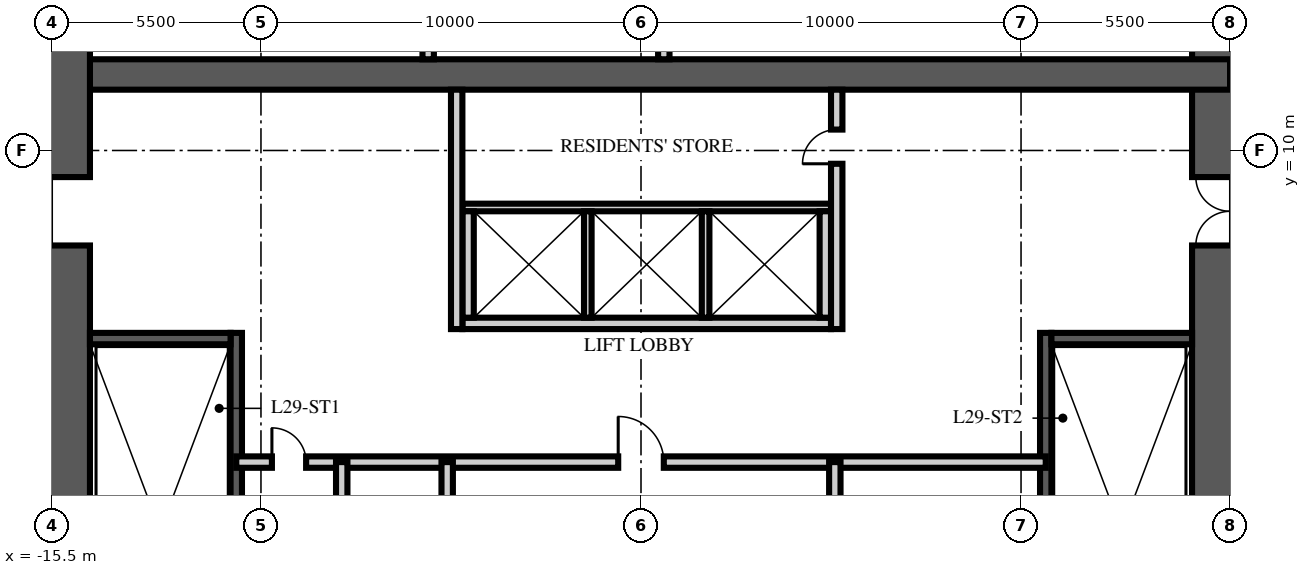
"""IFC4 building model, lengths in metres.
Left out: names, types, materials, properties, quantities, classifications, styles, units other than length and angle.
Written with IfcOpenShell. Run it as: python <this file> out.ifc"""

import sys

from ifc_helpers import new_model, si_unit, direction, frame, frame_2d, origin, place, context, subcontext, project, spatial, rectangle, extrude, element, fill, save


model = new_model("IFC4")
c1 = context("Model", 3, precision=1e-05, world=origin(), true_north=direction((0.0, 1.0)))
c2 = subcontext(c1, "Body", "Model", "MODEL_VIEW")
j1 = project(units=[si_unit("LENGTHUNIT", "METRE"), si_unit("PLANEANGLEUNIT", "RADIAN")], contexts=[c1])
p1 = place(None, origin())
s1 = spatial("IfcSite", under=j1, at=p1, CompositionType="ELEMENT")
p2 = place(p1, origin())
s2 = spatial("IfcBuilding", under=s1, at=p2, CompositionType="ELEMENT")
p3 = place(p2, frame((0.0, 0.0, 118.5)))
s3 = spatial("IfcBuildingStorey", under=s2, at=p3, CompositionType="ELEMENT", Elevation=118.5)
p4 = place(p3, frame((15.5, -15.5, -0.25), z_axis=(0.0, 0.0, 1.0), x_axis=(0.0, 1.0, 0.0)))
e1 = element("IfcWall", 1, at=p4, inside=s3, PredefinedType="SHEAR", context=c2, shape_type="SweptSolid", body=[
    extrude(rectangle(XDim=31.0, YDim=2.0, at=frame_2d((15.5, 0.0))), origin(), (0.0, 0.0, 1.0), 3.75),
])
p5 = place(p4, frame((6.5, 0.0, 0.25)))
e2 = element("IfcOpeningElement", 2, at=p5, cuts=e1, PredefinedType="OPENING", context=c2, shape_type="SweptSolid", body=[
    extrude(rectangle(XDim=1.2, YDim=2.1, at=frame_2d((0.6, 1.05))), frame((0.0, 1.01, 0.0), z_axis=(0.0, -1.0, 0.0), x_axis=(1.0, 0.0, 0.0)), (0.0, 0.0, 1.0), 2.02),
])
p6 = place(p4, frame((23.0, 0.0, 0.25)))
e3 = element("IfcOpeningElement", 3, at=p6, cuts=e1, PredefinedType="OPENING", context=c2, shape_type="SweptSolid", body=[
    extrude(rectangle(XDim=1.8, YDim=2.1, at=frame_2d((0.9, 1.05))), frame((0.0, 1.01, 0.0), z_axis=(0.0, -1.0, 0.0), x_axis=(1.0, 0.0, 0.0)), (0.0, 0.0, 1.0), 2.02),
])
p7 = place(p3, frame((-15.5, 12.0, -0.25), z_axis=(0.0, 0.0, 1.0), x_axis=(1.0, 0.0, 0.0)))
e4 = element("IfcWall", 4, at=p7, inside=s3, PredefinedType="SHEAR", context=c2, shape_type="SweptSolid", body=[
    extrude(rectangle(XDim=31.0, YDim=0.8, at=frame_2d((15.5, 0.0))), origin(), (0.0, 0.0, 1.0), 3.75),
])
p8 = place(p3, frame((-15.5, -15.5, -0.25), z_axis=(0.0, 0.0, 1.0), x_axis=(0.0, 1.0, 0.0)))
e5 = element("IfcWall", 5, at=p8, inside=s3, PredefinedType="SHEAR", context=c2, shape_type="SweptSolid", body=[
    extrude(rectangle(XDim=31.0, YDim=2.0, at=frame_2d((15.5, 0.0))), origin(), (0.0, 0.0, 1.0), 3.75),
])
p9 = place(p8, frame((6.5, 0.0, 0.25)))
e6 = element("IfcOpeningElement", 6, at=p9, cuts=e5, PredefinedType="OPENING", context=c2, shape_type="SweptSolid", body=[
    extrude(rectangle(XDim=1.2, YDim=2.1, at=frame_2d((0.6, 1.05))), frame((0.0, 1.01, 0.0), z_axis=(0.0, -1.0, 0.0), x_axis=(1.0, 0.0, 0.0)), (0.0, 0.0, 1.0), 2.02),
])
p10 = place(p8, frame((23.0, 0.0, 0.25)))
e7 = element("IfcOpeningElement", 7, at=p10, cuts=e5, PredefinedType="OPENING", context=c2, shape_type="SweptSolid", body=[
    extrude(rectangle(XDim=1.8, YDim=2.1, at=frame_2d((0.9, 1.05))), frame((0.0, 1.01, 0.0), z_axis=(0.0, -1.0, 0.0), x_axis=(1.0, 0.0, 0.0)), (0.0, 0.0, 1.0), 2.02),
])
p11 = place(p3, frame((-10.65, -4.9, 0.0), z_axis=(0.0, 0.0, 1.0), x_axis=(0.0, 1.0, 0.0)))
e8 = element("IfcWall", 8, at=p11, inside=s3, PredefinedType="SOLIDWALL", context=c2, shape_type="SweptSolid", body=[
    extrude(rectangle(XDim=10.1, YDim=0.3, at=frame_2d((5.05, 0.0))), origin(), (0.0, 0.0, 1.0), 3.5),
])
p12 = place(p3, frame((-14.5, 5.05, 0.0), z_axis=(0.0, 0.0, 1.0), x_axis=(1.0, 0.0, 0.0)))
e9 = element("IfcWall", 9, at=p12, inside=s3, PredefinedType="SOLIDWALL", context=c2, shape_type="SweptSolid", body=[
    extrude(rectangle(XDim=3.7, YDim=0.3, at=frame_2d((1.85, 0.0))), origin(), (0.0, 0.0, 1.0), 3.5),
])
p13 = place(p3, frame((10.65, -4.9, 0.0), z_axis=(0.0, 0.0, 1.0), x_axis=(0.0, 1.0, 0.0)))
e10 = element("IfcWall", 10, at=p13, inside=s3, PredefinedType="SOLIDWALL", context=c2, shape_type="SweptSolid", body=[
    extrude(rectangle(XDim=10.1, YDim=0.3, at=frame_2d((5.05, 0.0))), origin(), (0.0, 0.0, 1.0), 3.5),
])
p14 = place(p3, frame((14.5, 5.05, 0.0), z_axis=(0.0, 0.0, 1.0), x_axis=(-1.0, 0.0, 0.0)))
e11 = element("IfcWall", 11, at=p14, inside=s3, PredefinedType="SOLIDWALL", context=c2, shape_type="SweptSolid", body=[
    extrude(rectangle(XDim=3.7, YDim=0.3, at=frame_2d((1.85, 0.0))), origin(), (0.0, 0.0, 1.0), 3.5),
])
p15 = place(p3, frame((-4.7, 5.45, 0.0), z_axis=(0.0, 0.0, 1.0), x_axis=(1.0, 0.0, 0.0)))
e12 = element("IfcWall", 12, at=p15, inside=s3, PredefinedType="PARTITIONING", context=c2, shape_type="SweptSolid", body=[
    extrude(rectangle(XDim=9.7, YDim=0.3, at=frame_2d((4.85, 0.0))), origin(), (0.0, 0.0, 1.0), 3.5),
])
p16 = place(p3, frame((-4.7, 8.5, 0.0), z_axis=(0.0, 0.0, 1.0), x_axis=(1.0, 0.0, 0.0)))
e13 = element("IfcWall", 13, at=p16, inside=s3, PredefinedType="PARTITIONING", context=c2, shape_type="SweptSolid", body=[
    extrude(rectangle(XDim=9.7, YDim=0.2, at=frame_2d((4.85, 0.0))), origin(), (0.0, 0.0, 1.0), 3.5),
])
for number, where, z_axis, x_axis in (
    (14, (-4.55, 5.6, 0.0), (0.0, 0.0, 1.0), (0.0, 1.0, 0.0)),
    (15, (4.85, 5.6, 0.0), (0.0, 0.0, 1.0), (0.0, 1.0, 0.0)),
):
    element("IfcWall", number, at=place(p3, frame(where, z_axis=z_axis, x_axis=x_axis)), inside=s3, PredefinedType="PARTITIONING", context=c2, shape_type="SweptSolid", body=[
        extrude(rectangle(XDim=2.8, YDim=0.3, at=frame_2d((1.4, 0.0))), origin(), (0.0, 0.0, 1.0), 3.5),
    ])
for number, where, z_axis, x_axis in (
    (16, (-1.4, 5.6, 0.0), (0.0, 0.0, 1.0), (0.0, 1.0, 0.0)),
    (17, (1.7, 5.6, 0.0), (0.0, 0.0, 1.0), (0.0, 1.0, 0.0)),
):
    element("IfcWall", number, at=place(p3, frame(where, z_axis=z_axis, x_axis=x_axis)), inside=s3, PredefinedType="PARTITIONING", context=c2, shape_type="SweptSolid", body=[
        extrude(rectangle(XDim=2.8, YDim=0.2, at=frame_2d((1.4, 0.0))), origin(), (0.0, 0.0, 1.0), 3.5),
    ])
p17 = place(p3, frame((-10.65, 1.8, 0.0), z_axis=(0.0, 0.0, 1.0), x_axis=(1.0, 0.0, 0.0)))
e18 = element("IfcWall", 18, at=p17, inside=s3, PredefinedType="PARTITIONING", context=c2, shape_type="SweptSolid", body=[
    extrude(rectangle(XDim=21.3, YDim=0.3, at=frame_2d((10.65, 0.0))), origin(), (0.0, 0.0, 1.0), 3.5),
])
p18 = place(p17, frame((10.05, 0.0, 0.0)))
e19 = element("IfcOpeningElement", 19, at=p18, cuts=e18, PredefinedType="OPENING", context=c2, shape_type="SweptSolid", body=[
    extrude(rectangle(XDim=1.2, YDim=2.1, at=frame_2d((0.6, 1.05))), frame((0.0, 0.16, 0.0), z_axis=(0.0, -1.0, 0.0), x_axis=(1.0, 0.0, 0.0)), (0.0, 0.0, 1.0), 0.32),
])
p19 = place(p17, frame((0.938, 0.0, 0.0)))
e20 = element("IfcOpeningElement", 20, at=p19, cuts=e18, PredefinedType="OPENING", context=c2, shape_type="SweptSolid", body=[
    extrude(rectangle(XDim=0.9, YDim=2.1, at=frame_2d((0.45, 1.05))), frame((0.0, 0.16, 0.0), z_axis=(0.0, -1.0, 0.0), x_axis=(1.0, 0.0, 0.0)), (0.0, 0.0, 1.0), 0.32),
])
p20 = place(p3, frame((-5.1, -6.65, 0.0), z_axis=(0.0, 0.0, 1.0), x_axis=(0.0, 1.0, 0.0)))
e21 = element("IfcWall", 21, at=p20, inside=s3, PredefinedType="PARTITIONING", context=c2, shape_type="SweptSolid", body=[
    extrude(rectangle(XDim=8.45, YDim=0.3, at=frame_2d((4.225, 0.0))), origin(), (0.0, 0.0, 1.0), 3.5),
])
p21 = place(p20, frame((1.7, 0.0, 0.0)))
e22 = element("IfcOpeningElement", 22, at=p21, cuts=e21, PredefinedType="OPENING", context=c2, shape_type="SweptSolid", body=[
    extrude(rectangle(XDim=0.9, YDim=2.1, at=frame_2d((0.45, 1.05))), frame((0.0, 0.16, 0.0), z_axis=(0.0, -1.0, 0.0), x_axis=(1.0, 0.0, 0.0)), (0.0, 0.0, 1.0), 0.32),
])
p22 = place(p20, frame((5.925, 0.0, 0.0)))
e23 = element("IfcOpeningElement", 23, at=p22, cuts=e21, PredefinedType="OPENING", context=c2, shape_type="SweptSolid", body=[
    extrude(rectangle(XDim=0.9, YDim=2.1, at=frame_2d((0.45, 1.05))), frame((0.0, 0.16, 0.0), z_axis=(0.0, -1.0, 0.0), x_axis=(1.0, 0.0, 0.0)), (0.0, 0.0, 1.0), 0.32),
])
p23 = place(p3, frame((5.1, -6.65, 0.0), z_axis=(0.0, 0.0, 1.0), x_axis=(0.0, 1.0, 0.0)))
e24 = element("IfcWall", 24, at=p23, inside=s3, PredefinedType="PARTITIONING", context=c2, shape_type="SweptSolid", body=[
    extrude(rectangle(XDim=8.45, YDim=0.3, at=frame_2d((4.225, 0.0))), origin(), (0.0, 0.0, 1.0), 3.5),
])
p24 = place(p23, frame((1.866, 0.0, 0.0)))
e25 = element("IfcOpeningElement", 25, at=p24, cuts=e24, PredefinedType="OPENING", context=c2, shape_type="SweptSolid", body=[
    extrude(rectangle(XDim=0.9, YDim=2.1, at=frame_2d((0.45, 1.05))), frame((0.0, 0.16, 0.0), z_axis=(0.0, -1.0, 0.0), x_axis=(1.0, 0.0, 0.0)), (0.0, 0.0, 1.0), 0.32),
])
p25 = place(p23, frame((6.091, 0.0, 0.0)))
e26 = element("IfcOpeningElement", 26, at=p25, cuts=e24, PredefinedType="OPENING", context=c2, shape_type="SweptSolid", body=[
    extrude(rectangle(XDim=0.9, YDim=2.1, at=frame_2d((0.45, 1.05))), frame((0.0, 0.16, 0.0), z_axis=(0.0, -1.0, 0.0), x_axis=(1.0, 0.0, 0.0)), (0.0, 0.0, 1.0), 0.32),
])
p26 = place(p3, frame((-7.875, -2.35, 0.0), z_axis=(0.0, 0.0, 1.0), x_axis=(0.0, 1.0, 0.0)))
e27 = element("IfcWall", 27, at=p26, inside=s3, PredefinedType="PARTITIONING", context=c2, shape_type="SweptSolid", body=[
    extrude(rectangle(XDim=4.15, YDim=0.3, at=frame_2d((2.075, 0.0))), origin(), (0.0, 0.0, 1.0), 3.5),
])
p27 = place(p3, frame((-4.85, 5.3, 0.0), z_axis=(0.0, 0.0, 1.0), x_axis=(0.0, 1.0, 0.0)))
e28 = element("IfcWall", 28, at=p27, inside=s3, PredefinedType="PARTITIONING", context=c2, shape_type="SweptSolid", body=[
    extrude(rectangle(XDim=6.3, YDim=0.3, at=frame_2d((3.15, 0.0))), origin(), (0.0, 0.0, 1.0), 3.5),
])
p28 = place(p3, frame((5.15, 5.3, 0.0), z_axis=(0.0, 0.0, 1.0), x_axis=(0.0, 1.0, 0.0)))
e29 = element("IfcWall", 29, at=p28, inside=s3, PredefinedType="PARTITIONING", context=c2, shape_type="SweptSolid", body=[
    extrude(rectangle(XDim=6.3, YDim=0.3, at=frame_2d((3.15, 0.0))), origin(), (0.0, 0.0, 1.0), 3.5),
])
p29 = place(p28, frame((4.35, 0.0, 0.0)))
e30 = element("IfcOpeningElement", 30, at=p29, cuts=e29, PredefinedType="OPENING", context=c2, shape_type="SweptSolid", body=[
    extrude(rectangle(XDim=0.9, YDim=2.1, at=frame_2d((0.45, 1.05))), frame((0.0, 0.16, 0.0), z_axis=(0.0, -1.0, 0.0), x_axis=(1.0, 0.0, 0.0)), (0.0, 0.0, 1.0), 0.32),
])
p30 = place(p3, frame((-5.6, 12.4, 0.0), z_axis=(0.0, 0.0, 1.0), x_axis=(0.0, 1.0, 0.0)))
e31 = element("IfcWall", 31, at=p30, inside=s3, PredefinedType="PARTITIONING", context=c2, shape_type="SweptSolid", body=[
    extrude(rectangle(XDim=2.1, YDim=0.3, at=frame_2d((1.05, 0.0))), origin(), (0.0, 0.0, 1.0), 3.5),
])
p31 = place(p30, frame((0.6, 0.0, 0.0)))
e32 = element("IfcOpeningElement", 32, at=p31, cuts=e31, PredefinedType="OPENING", context=c2, shape_type="SweptSolid", body=[
    extrude(rectangle(XDim=0.9, YDim=2.1, at=frame_2d((0.45, 1.05))), frame((0.0, 0.16, 0.0), z_axis=(0.0, -1.0, 0.0), x_axis=(1.0, 0.0, 0.0)), (0.0, 0.0, 1.0), 0.32),
])
p32 = place(p3, frame((0.6, 12.4, 0.0), z_axis=(0.0, 0.0, 1.0), x_axis=(0.0, 1.0, 0.0)))
e33 = element("IfcWall", 33, at=p32, inside=s3, PredefinedType="PARTITIONING", context=c2, shape_type="SweptSolid", body=[
    extrude(rectangle(XDim=2.1, YDim=0.3, at=frame_2d((1.05, 0.0))), origin(), (0.0, 0.0, 1.0), 3.5),
])
p33 = place(p32, frame((0.6, 0.0, 0.0)))
e34 = element("IfcOpeningElement", 34, at=p33, cuts=e33, PredefinedType="OPENING", context=c2, shape_type="SweptSolid", body=[
    extrude(rectangle(XDim=0.9, YDim=2.1, at=frame_2d((0.45, 1.05))), frame((0.0, 0.16, 0.0), z_axis=(0.0, -1.0, 0.0), x_axis=(1.0, 0.0, 0.0)), (0.0, 0.0, 1.0), 0.32),
])
p34 = place(p10, origin())
e35 = element("IfcDoor", 35, at=p34, inside=s3, OperationType="DOUBLE_DOOR_SINGLE_SWING", PredefinedType="DOOR", context=c2, shape_type="SweptSolid", body=[
    extrude(rectangle(XDim=1.8, YDim=2.1, at=frame_2d((0.9, 1.05))), frame((0.0, 0.025, 0.0), z_axis=(0.0, -1.0, 0.0), x_axis=(1.0, 0.0, 0.0)), (0.0, 0.0, 1.0), 0.05),
])
fill(e7, e35)
p35 = place(p6, origin())
e36 = element("IfcDoor", 36, at=p35, inside=s3, OperationType="DOUBLE_DOOR_SINGLE_SWING", PredefinedType="DOOR", context=c2, shape_type="SweptSolid", body=[
    extrude(rectangle(XDim=1.8, YDim=2.1, at=frame_2d((0.9, 1.05))), frame((0.0, 0.025, 0.0), z_axis=(0.0, -1.0, 0.0), x_axis=(1.0, 0.0, 0.0)), (0.0, 0.0, 1.0), 0.05),
])
fill(e3, e36)
p36 = place(p18, origin())
e37 = element("IfcDoor", 37, at=p36, inside=s3, OperationType="SINGLE_SWING_LEFT", PredefinedType="DOOR", context=c2, shape_type="SweptSolid", body=[
    extrude(rectangle(XDim=1.2, YDim=2.1, at=frame_2d((0.6, 1.05))), frame((0.0, 0.025, 0.0), z_axis=(0.0, -1.0, 0.0), x_axis=(1.0, 0.0, 0.0)), (0.0, 0.0, 1.0), 0.05),
])
fill(e19, e37)
p37 = place(p19, origin())
e38 = element("IfcDoor", 38, at=p37, inside=s3, OperationType="SINGLE_SWING_LEFT", PredefinedType="DOOR", context=c2, shape_type="SweptSolid", body=[
    extrude(rectangle(XDim=0.9, YDim=2.1, at=frame_2d((0.45, 1.05))), frame((0.0, 0.025, 0.0), z_axis=(0.0, -1.0, 0.0), x_axis=(1.0, 0.0, 0.0)), (0.0, 0.0, 1.0), 0.05),
])
fill(e20, e38)
p38 = place(p29, origin())
e39 = element("IfcDoor", 39, at=p38, inside=s3, OperationType="SINGLE_SWING_LEFT", PredefinedType="DOOR", context=c2, shape_type="SweptSolid", body=[
    extrude(rectangle(XDim=0.9, YDim=2.1, at=frame_2d((0.45, 1.05))), frame((0.0, 0.025, 0.0), z_axis=(0.0, -1.0, 0.0), x_axis=(1.0, 0.0, 0.0)), (0.0, 0.0, 1.0), 0.05),
])
fill(e30, e39)
save(model, sys.argv[1])
